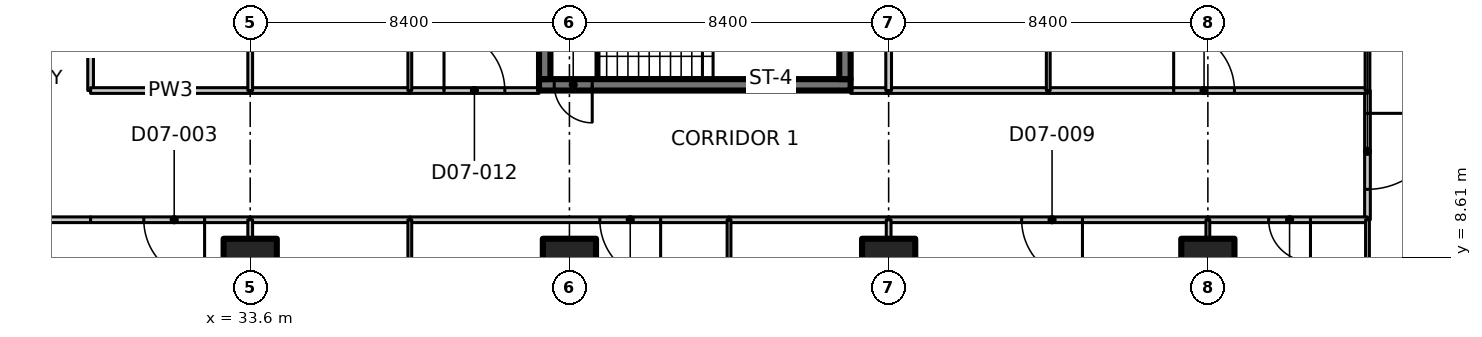
"""IFC4 building model, lengths in metres.
Left out: names, types, materials, properties, quantities, classifications, styles, units other than length and angle.
Written with IfcOpenShell. Run it as: python <this file> out.ifc"""

import sys

from ifc_helpers import new_model, si_unit, direction, frame, frame_2d, origin, origin_2d, place, context, subcontext, project, spatial, polyline, rectangle, outline, extrude, element, fill, save


model = new_model("IFC4")
c1 = context("Model", 3, precision=1e-05, world=origin(), true_north=direction((0.0, 1.0)))
c2 = subcontext(c1, "Body", "Model", "MODEL_VIEW")
j1 = project(units=[si_unit("LENGTHUNIT", "METRE"), si_unit("PLANEANGLEUNIT", "RADIAN")], contexts=[c1])
p1 = place(None, origin())
s1 = spatial("IfcSite", under=j1, at=p1, CompositionType="ELEMENT")
p2 = place(p1, origin())
s2 = spatial("IfcBuilding", under=s1, at=p2, CompositionType="ELEMENT")
p3 = place(p2, frame((0.0, 0.0, 43.7)))
s3 = spatial("IfcBuildingStorey", under=s2, at=p3, CompositionType="ELEMENT", Elevation=43.7)
for number, where, z_axis, x_axis in (
    (1, (33.6, 8.4, 0.0), (0.0, 0.0, 1.0), (1.0, 0.0, 0.0)),
    (2, (42.0, 8.4, 0.0), (0.0, 0.0, 1.0), (1.0, 0.0, 0.0)),
    (3, (50.4, 8.4, 0.0), (0.0, 0.0, 1.0), (1.0, 0.0, 0.0)),
    (4, (58.8, 8.4, 0.0), (0.0, 0.0, 1.0), (1.0, 0.0, 0.0)),
):
    element("IfcColumn", number, at=place(p3, frame(where, z_axis=z_axis, x_axis=x_axis)), inside=s3, PredefinedType="COLUMN", context=c2, shape_type="SweptSolid", body=[
        extrude(rectangle(XDim=1.4, YDim=1.4, at=origin_2d()), origin(), (0.0, 0.0, 1.0), 3.35),
    ])
p4 = place(p3, frame((49.4, 13.15, 0.0), z_axis=(0.0, 0.0, 1.0), x_axis=(-1.0, 0.0, 0.0)))
e5 = element("IfcWall", 5, at=p4, inside=s3, PredefinedType="SHEAR", context=c2, shape_type="SweptSolid", body=[
    extrude(rectangle(XDim=8.2, YDim=0.3, at=frame_2d((4.1, 0.0))), origin(), (0.0, 0.0, 1.0), 3.35),
])
p5 = place(p4, frame((6.8, 0.0, 0.0)))
e6 = element("IfcOpeningElement", 6, at=p5, cuts=e5, PredefinedType="OPENING", context=c2, shape_type="SweptSolid", body=[
    extrude(rectangle(XDim=1.0, YDim=2.1, at=frame_2d((0.5, 1.05))), frame((0.0, 0.16, 0.0), z_axis=(0.0, -1.0, 0.0), x_axis=(1.0, 0.0, 0.0)), (0.0, 0.0, 1.0), 0.32),
])
for number, where, z_axis, x_axis in (
    (7, (41.35, 13.3, 0.0), (0.0, 0.0, 1.0), (0.0, 1.0, 0.0)),
    (8, (49.25, 13.3, 0.0), (0.0, 0.0, 1.0), (0.0, 1.0, 0.0)),
):
    element("IfcWall", number, at=place(p3, frame(where, z_axis=z_axis, x_axis=x_axis)), inside=s3, PredefinedType="SHEAR", context=c2, shape_type="SweptSolid", body=[
        extrude(rectangle(XDim=2.55, YDim=0.3, at=frame_2d((1.275, 0.0))), origin(), (0.0, 0.0, 1.0), 3.35),
    ])
p6 = place(p3, frame((29.4, 9.6, 0.0), z_axis=(0.0, 0.0, 1.0), x_axis=(-1.0, 0.0, 0.0)))
e9 = element("IfcWall", 9, at=p6, inside=s3, PredefinedType="PARTITIONING", context=c2, shape_type="SweptSolid", body=[
    extrude(rectangle(XDim=4.2, YDim=0.15, at=frame_2d((2.1, 0.0))), origin(), (0.0, 0.0, 1.0), 3.33),
])
p7 = place(p3, frame((29.4, 21.2, 0.0), z_axis=(0.0, 0.0, 1.0), x_axis=(0.0, -1.0, 0.0)))
e10 = element("IfcWall", 10, at=p7, inside=s3, PredefinedType="PARTITIONING", context=c2, shape_type="SweptSolid", body=[
    extrude(rectangle(XDim=8.2, YDim=0.15, at=frame_2d((4.1, 0.0))), origin(), (0.0, 0.0, 1.0), 3.33),
])
p8 = place(p7, frame((3.3, 0.0, 0.0)))
e11 = element("IfcOpeningElement", 11, at=p8, cuts=e10, PredefinedType="OPENING", context=c2, shape_type="SweptSolid", body=[
    extrude(rectangle(XDim=1.6, YDim=2.1, at=frame_2d((0.8, 1.05))), frame((0.0, 0.085, 0.0), z_axis=(0.0, -1.0, 0.0), x_axis=(1.0, 0.0, 0.0)), (0.0, 0.0, 1.0), 0.17),
])
p9 = place(p3, frame((63.0, 13.0, 0.0), z_axis=(0.0, 0.0, 1.0), x_axis=(0.0, -1.0, 0.0)))
e12 = element("IfcWall", 12, at=p9, inside=s3, PredefinedType="PARTITIONING", context=c2, shape_type="SweptSolid", body=[
    extrude(rectangle(XDim=3.4, YDim=0.15, at=frame_2d((1.7, 0.0))), origin(), (0.0, 0.0, 1.0), 3.33),
])
p10 = place(p9, frame((0.6, 0.0, 0.0)))
e13 = element("IfcOpeningElement", 13, at=p10, cuts=e12, PredefinedType="OPENING", context=c2, shape_type="SweptSolid", body=[
    extrude(rectangle(XDim=2.0, YDim=2.4, at=frame_2d((1.0, 1.2))), frame((0.0, 0.085, 0.0), z_axis=(0.0, -1.0, 0.0), x_axis=(1.0, 0.0, 0.0)), (0.0, 0.0, 1.0), 0.17),
])
p11 = place(p3, frame((33.6, 9.6, 0.0), z_axis=(0.0, 0.0, 1.0), x_axis=(-1.0, 0.0, 0.0)))
e14 = element("IfcWall", 14, at=p11, inside=s3, PredefinedType="PARTITIONING", context=c2, shape_type="SweptSolid", body=[
    extrude(rectangle(XDim=4.2, YDim=0.15, at=frame_2d((2.1, 0.0))), origin(), (0.0, 0.0, 1.0), 3.33),
])
p12 = place(p11, frame((1.2, 0.0, 0.0)))
e15 = element("IfcOpeningElement", 15, at=p12, cuts=e14, PredefinedType="OPENING", context=c2, shape_type="SweptSolid", body=[
    extrude(rectangle(XDim=1.6, YDim=2.1, at=frame_2d((0.8, 1.05))), frame((0.0, 0.085, 0.0), z_axis=(0.0, -1.0, 0.0), x_axis=(1.0, 0.0, 0.0)), (0.0, 0.0, 1.0), 0.17),
])
p13 = place(p3, frame((46.2, 9.6, 0.0), z_axis=(0.0, 0.0, 1.0), x_axis=(-1.0, 0.0, 0.0)))
e16 = element("IfcWall", 16, at=p13, inside=s3, PredefinedType="PARTITIONING", context=c2, shape_type="SweptSolid", body=[
    extrude(rectangle(XDim=8.4, YDim=0.15, at=frame_2d((4.2, 0.0))), origin(), (0.0, 0.0, 1.0), 3.33),
])
p14 = place(p13, frame((1.8, 0.0, 0.0)))
e17 = element("IfcOpeningElement", 17, at=p14, cuts=e16, PredefinedType="OPENING", context=c2, shape_type="SweptSolid", body=[
    extrude(rectangle(XDim=1.6, YDim=2.1, at=frame_2d((0.8, 1.05))), frame((0.0, 0.085, 0.0), z_axis=(0.0, -1.0, 0.0), x_axis=(1.0, 0.0, 0.0)), (0.0, 0.0, 1.0), 0.17),
])
for number, where, z_axis, x_axis in (
    (18, (50.4, 9.6, 0.0), (0.0, 0.0, 1.0), (-1.0, 0.0, 0.0)),
    (19, (37.8, 9.6, 0.0), (0.0, 0.0, 1.0), (-1.0, 0.0, 0.0)),
):
    element("IfcWall", number, at=place(p3, frame(where, z_axis=z_axis, x_axis=x_axis)), inside=s3, PredefinedType="PARTITIONING", context=c2, shape_type="SweptSolid", body=[
        extrude(rectangle(XDim=4.2, YDim=0.15, at=frame_2d((2.1, 0.0))), origin(), (0.0, 0.0, 1.0), 3.33),
    ])
p15 = place(p3, frame((58.8, 9.6, 0.0), z_axis=(0.0, 0.0, 1.0), x_axis=(-1.0, 0.0, 0.0)))
e20 = element("IfcWall", 20, at=p15, inside=s3, PredefinedType="PARTITIONING", context=c2, shape_type="SweptSolid", body=[
    extrude(rectangle(XDim=8.4, YDim=0.15, at=frame_2d((4.2, 0.0))), origin(), (0.0, 0.0, 1.0), 3.33),
])
p16 = place(p15, frame((3.3, 0.0, 0.0)))
e21 = element("IfcOpeningElement", 21, at=p16, cuts=e20, PredefinedType="OPENING", context=c2, shape_type="SweptSolid", body=[
    extrude(rectangle(XDim=1.6, YDim=2.1, at=frame_2d((0.8, 1.05))), frame((0.0, 0.085, 0.0), z_axis=(0.0, -1.0, 0.0), x_axis=(1.0, 0.0, 0.0)), (0.0, 0.0, 1.0), 0.17),
])
p17 = place(p3, frame((63.0, 9.6, 0.0), z_axis=(0.0, 0.0, 1.0), x_axis=(-1.0, 0.0, 0.0)))
e22 = element("IfcWall", 22, at=p17, inside=s3, PredefinedType="PARTITIONING", context=c2, shape_type="SweptSolid", body=[
    extrude(rectangle(XDim=4.2, YDim=0.15, at=frame_2d((2.1, 0.0))), origin(), (0.0, 0.0, 1.0), 3.33),
])
p18 = place(p17, frame((1.5, 0.0, 0.0)))
e23 = element("IfcOpeningElement", 23, at=p18, cuts=e22, PredefinedType="OPENING", context=c2, shape_type="SweptSolid", body=[
    extrude(rectangle(XDim=1.1, YDim=2.1, at=frame_2d((0.55, 1.05))), frame((0.0, 0.085, 0.0), z_axis=(0.0, -1.0, 0.0), x_axis=(1.0, 0.0, 0.0)), (0.0, 0.0, 1.0), 0.17),
])
p19 = place(p3, frame((29.4, 13.0, 0.0), z_axis=(0.0, 0.0, 1.0), x_axis=(1.0, 0.0, 0.0)))
e24 = element("IfcWall", 24, at=p19, inside=s3, PredefinedType="PARTITIONING", context=c2, shape_type="SweptSolid", body=[
    extrude(rectangle(XDim=4.2, YDim=0.15, at=frame_2d((2.1, 0.0))), origin(), (0.0, 0.0, 1.0), 3.33),
])
p20 = place(p3, frame((37.8, 13.0, 0.0), z_axis=(0.0, 0.0, 1.0), x_axis=(1.0, 0.0, 0.0)))
e25 = element("IfcWall", 25, at=p20, inside=s3, PredefinedType="PARTITIONING", context=c2, shape_type="SweptSolid", body=[
    extrude(rectangle(XDim=3.4, YDim=0.15, at=frame_2d((1.7, 0.0))), origin(), (0.0, 0.0, 1.0), 3.33),
])
p21 = place(p20, frame((0.9, 0.0, 0.0)))
e26 = element("IfcOpeningElement", 26, at=p21, cuts=e25, PredefinedType="OPENING", context=c2, shape_type="SweptSolid", body=[
    extrude(rectangle(XDim=1.6, YDim=2.1, at=frame_2d((0.8, 1.05))), frame((0.0, 0.085, 0.0), z_axis=(0.0, -1.0, 0.0), x_axis=(1.0, 0.0, 0.0)), (0.0, 0.0, 1.0), 0.17),
])
p22 = place(p3, frame((49.4, 13.0, 0.0), z_axis=(0.0, 0.0, 1.0), x_axis=(1.0, 0.0, 0.0)))
e27 = element("IfcWall", 27, at=p22, inside=s3, PredefinedType="PARTITIONING", context=c2, shape_type="SweptSolid", body=[
    extrude(rectangle(XDim=1.0, YDim=0.15, at=frame_2d((0.5, 0.0))), origin(), (0.0, 0.0, 1.0), 3.33),
])
p23 = place(p3, frame((33.6, 13.0, 0.0), z_axis=(0.0, 0.0, 1.0), x_axis=(1.0, 0.0, 0.0)))
e28 = element("IfcWall", 28, at=p23, inside=s3, PredefinedType="PARTITIONING", context=c2, shape_type="SweptSolid", body=[
    extrude(rectangle(XDim=4.2, YDim=0.15, at=frame_2d((2.1, 0.0))), origin(), (0.0, 0.0, 1.0), 3.33),
])
p24 = place(p3, frame((54.6, 13.0, 0.0), z_axis=(0.0, 0.0, 1.0), x_axis=(1.0, 0.0, 0.0)))
e29 = element("IfcWall", 29, at=p24, inside=s3, PredefinedType="PARTITIONING", context=c2, shape_type="SweptSolid", body=[
    extrude(rectangle(XDim=8.4, YDim=0.15, at=frame_2d((4.2, 0.0))), origin(), (0.0, 0.0, 1.0), 3.33),
])
p25 = place(p24, frame((3.3, 0.0, 0.0)))
e30 = element("IfcOpeningElement", 30, at=p25, cuts=e29, PredefinedType="OPENING", context=c2, shape_type="SweptSolid", body=[
    extrude(rectangle(XDim=1.6, YDim=2.1, at=frame_2d((0.8, 1.05))), frame((0.0, 0.085, 0.0), z_axis=(0.0, -1.0, 0.0), x_axis=(1.0, 0.0, 0.0)), (0.0, 0.0, 1.0), 0.17),
])
p26 = place(p3, frame((50.4, 13.0, 0.0), z_axis=(0.0, 0.0, 1.0), x_axis=(1.0, 0.0, 0.0)))
e31 = element("IfcWall", 31, at=p26, inside=s3, PredefinedType="PARTITIONING", context=c2, shape_type="SweptSolid", body=[
    extrude(rectangle(XDim=4.2, YDim=0.15, at=frame_2d((2.1, 0.0))), origin(), (0.0, 0.0, 1.0), 3.33),
])
p27 = place(p3, frame((63.0, -0.2, 0.0), z_axis=(0.0, 0.0, 1.0), x_axis=(0.0, 1.0, 0.0)))
e32 = element("IfcWall", 32, at=p27, inside=s3, PredefinedType="PARTITIONING", context=c2, shape_type="SweptSolid", body=[
    extrude(outline(polyline([(0.0, 0.0), (9.8, 0.0), (9.8, 3.33), (5.066, 3.33), (5.064, 2.98), (3.736, 2.98), (3.734, 3.33), (0.0, 3.33), (0.0, 0.0)])), frame((0.0, 0.05, 0.0), z_axis=(0.0, -1.0, 0.0), x_axis=(1.0, 0.0, 0.0)), (0.0, 0.0, 1.0), 0.1),
])
p28 = place(p3, frame((63.0, 13.0, 0.0), z_axis=(0.0, 0.0, 1.0), x_axis=(0.0, 1.0, 0.0)))
e33 = element("IfcWall", 33, at=p28, inside=s3, PredefinedType="PARTITIONING", context=c2, shape_type="SweptSolid", body=[
    extrude(outline(polyline([(0.0, 0.0), (12.4, 0.0), (12.4, 3.33), (8.678, 3.33), (8.676, 2.98), (7.324, 2.98), (7.322, 3.33), (0.0, 3.33), (0.0, 0.0)])), frame((0.0, 0.062, 0.0), z_axis=(0.0, -1.0, 0.0), x_axis=(1.0, 0.0, 0.0)), (0.0, 0.0, 1.0), 0.125),
])
p29 = place(p3, frame((33.6, 9.6, 0.0), z_axis=(0.0, 0.0, 1.0), x_axis=(0.0, -1.0, 0.0)))
e34 = element("IfcWall", 34, at=p29, inside=s3, PredefinedType="PARTITIONING", context=c2, shape_type="SweptSolid", body=[
    extrude(rectangle(XDim=0.48, YDim=0.125, at=frame_2d((0.24, 0.0))), origin(), (0.0, 0.0, 1.0), 3.33),
])
p30 = place(p3, frame((46.2, 9.6, 0.0), z_axis=(0.0, 0.0, 1.0), x_axis=(0.0, -1.0, 0.0)))
e35 = element("IfcWall", 35, at=p30, inside=s3, PredefinedType="PARTITIONING", context=c2, shape_type="SweptSolid", body=[
    extrude(rectangle(XDim=7.8, YDim=0.1, at=frame_2d((3.9, 0.0))), origin(), (0.0, 0.0, 1.0), 3.33),
])
p31 = place(p30, frame((3.3, 0.0, 0.0)))
e36 = element("IfcOpeningElement", 36, at=p31, cuts=e35, PredefinedType="OPENING", context=c2, shape_type="SweptSolid", body=[
    extrude(rectangle(XDim=1.0, YDim=2.1, at=frame_2d((0.5, 1.05))), frame((0.0, 0.06, 0.0), z_axis=(0.0, -1.0, 0.0), x_axis=(1.0, 0.0, 0.0)), (0.0, 0.0, 1.0), 0.12),
])
p32 = place(p3, frame((37.8, 1.8, 0.0), z_axis=(0.0, 0.0, 1.0), x_axis=(0.0, 1.0, 0.0)))
e37 = element("IfcWall", 37, at=p32, inside=s3, PredefinedType="PARTITIONING", context=c2, shape_type="SweptSolid", body=[
    extrude(rectangle(XDim=7.8, YDim=0.1, at=frame_2d((3.9, 0.0))), origin(), (0.0, 0.0, 1.0), 3.33),
])
p33 = place(p32, frame((3.3, 0.0, 0.0)))
e38 = element("IfcOpeningElement", 38, at=p33, cuts=e37, PredefinedType="OPENING", context=c2, shape_type="SweptSolid", body=[
    extrude(rectangle(XDim=1.0, YDim=2.1, at=frame_2d((0.5, 1.05))), frame((0.0, 0.06, 0.0), z_axis=(0.0, -1.0, 0.0), x_axis=(1.0, 0.0, 0.0)), (0.0, 0.0, 1.0), 0.12),
])
p34 = place(p3, frame((50.4, 9.6, 0.0), z_axis=(0.0, 0.0, 1.0), x_axis=(0.0, -1.0, 0.0)))
e39 = element("IfcWall", 39, at=p34, inside=s3, PredefinedType="PARTITIONING", context=c2, shape_type="SweptSolid", body=[
    extrude(rectangle(XDim=0.48, YDim=0.125, at=frame_2d((0.24, 0.0))), origin(), (0.0, 0.0, 1.0), 3.33),
])
p35 = place(p3, frame((58.8, 9.6, 0.0), z_axis=(0.0, 0.0, 1.0), x_axis=(0.0, -1.0, 0.0)))
e40 = element("IfcWall", 40, at=p35, inside=s3, PredefinedType="PARTITIONING", context=c2, shape_type="SweptSolid", body=[
    extrude(rectangle(XDim=0.48, YDim=0.1, at=frame_2d((0.24, 0.0))), origin(), (0.0, 0.0, 1.0), 3.33),
])
p36 = place(p3, frame((33.6, 16.08, 0.0), z_axis=(0.0, 0.0, 1.0), x_axis=(0.0, -1.0, 0.0)))
e41 = element("IfcWall", 41, at=p36, inside=s3, PredefinedType="PARTITIONING", context=c2, shape_type="SweptSolid", body=[
    extrude(rectangle(XDim=3.08, YDim=0.125, at=frame_2d((1.54, 0.0))), origin(), (0.0, 0.0, 1.0), 3.33),
])
p37 = place(p3, frame((37.8, 13.0, 0.0), z_axis=(0.0, 0.0, 1.0), x_axis=(0.0, 1.0, 0.0)))
e42 = element("IfcWall", 42, at=p37, inside=s3, PredefinedType="PARTITIONING", context=c2, shape_type="SweptSolid", body=[
    extrude(rectangle(XDim=6.6, YDim=0.1, at=frame_2d((3.3, 0.0))), origin(), (0.0, 0.0, 1.0), 3.33),
])
p38 = place(p37, frame((2.7, 0.0, 0.0)))
e43 = element("IfcOpeningElement", 43, at=p38, cuts=e42, PredefinedType="OPENING", context=c2, shape_type="SweptSolid", body=[
    extrude(rectangle(XDim=1.0, YDim=2.1, at=frame_2d((0.5, 1.05))), frame((0.0, 0.06, 0.0), z_axis=(0.0, -1.0, 0.0), x_axis=(1.0, 0.0, 0.0)), (0.0, 0.0, 1.0), 0.12),
])
p39 = place(p3, frame((50.4, 16.08, 0.0), z_axis=(0.0, 0.0, 1.0), x_axis=(0.0, -1.0, 0.0)))
e44 = element("IfcWall", 44, at=p39, inside=s3, PredefinedType="PARTITIONING", context=c2, shape_type="SweptSolid", body=[
    extrude(rectangle(XDim=3.08, YDim=0.15, at=frame_2d((1.54, 0.0))), origin(), (0.0, 0.0, 1.0), 3.33),
])
p40 = place(p3, frame((54.6, 13.0, 0.0), z_axis=(0.0, 0.0, 1.0), x_axis=(0.0, 1.0, 0.0)))
e45 = element("IfcWall", 45, at=p40, inside=s3, PredefinedType="PARTITIONING", context=c2, shape_type="SweptSolid", body=[
    extrude(rectangle(XDim=9.0, YDim=0.1, at=frame_2d((4.5, 0.0))), origin(), (0.0, 0.0, 1.0), 3.33),
])
p41 = place(p40, frame((3.9, 0.0, 0.0)))
e46 = element("IfcOpeningElement", 46, at=p41, cuts=e45, PredefinedType="OPENING", context=c2, shape_type="SweptSolid", body=[
    extrude(rectangle(XDim=1.0, YDim=2.1, at=frame_2d((0.5, 1.05))), frame((0.0, 0.06, 0.0), z_axis=(0.0, -1.0, 0.0), x_axis=(1.0, 0.0, 0.0)), (0.0, 0.0, 1.0), 0.12),
])
p42 = place(p5, origin())
e47 = element("IfcDoor", 47, at=p42, inside=s3, OperationType="SINGLE_SWING_LEFT", PredefinedType="DOOR", context=c2, shape_type="SweptSolid", body=[
    extrude(rectangle(XDim=1.0, YDim=2.1, at=frame_2d((0.5, 1.05))), frame((0.0, 0.025, 0.0), z_axis=(0.0, -1.0, 0.0), x_axis=(1.0, 0.0, 0.0)), (0.0, 0.0, 1.0), 0.05),
])
fill(e6, e47)
p43 = place(p10, origin())
e48 = element("IfcDoor", 48, at=p43, inside=s3, OperationType="DOUBLE_DOOR_SINGLE_SWING", PredefinedType="DOOR", context=c2, shape_type="SweptSolid", body=[
    extrude(rectangle(XDim=2.0, YDim=2.4, at=frame_2d((1.0, 1.2))), frame((0.0, 0.025, 0.0), z_axis=(0.0, -1.0, 0.0), x_axis=(1.0, 0.0, 0.0)), (0.0, 0.0, 1.0), 0.05),
])
fill(e13, e48)
p44 = place(p12, origin())
e49 = element("IfcDoor", 49, at=p44, inside=s3, OperationType="DOUBLE_DOOR_SINGLE_SWING", PredefinedType="DOOR", context=c2, shape_type="SweptSolid", body=[
    extrude(rectangle(XDim=1.6, YDim=2.1, at=frame_2d((0.8, 1.05))), frame((0.0, 0.025, 0.0), z_axis=(0.0, -1.0, 0.0), x_axis=(1.0, 0.0, 0.0)), (0.0, 0.0, 1.0), 0.05),
])
fill(e15, e49)
p45 = place(p14, origin())
e50 = element("IfcDoor", 50, at=p45, inside=s3, OperationType="DOUBLE_DOOR_SINGLE_SWING", PredefinedType="DOOR", context=c2, shape_type="SweptSolid", body=[
    extrude(rectangle(XDim=1.6, YDim=2.1, at=frame_2d((0.8, 1.05))), frame((0.0, 0.025, 0.0), z_axis=(0.0, -1.0, 0.0), x_axis=(1.0, 0.0, 0.0)), (0.0, 0.0, 1.0), 0.05),
])
fill(e17, e50)
p46 = place(p16, origin())
e51 = element("IfcDoor", 51, at=p46, inside=s3, OperationType="DOUBLE_DOOR_SINGLE_SWING", PredefinedType="DOOR", context=c2, shape_type="SweptSolid", body=[
    extrude(rectangle(XDim=1.6, YDim=2.1, at=frame_2d((0.8, 1.05))), frame((0.0, 0.025, 0.0), z_axis=(0.0, -1.0, 0.0), x_axis=(1.0, 0.0, 0.0)), (0.0, 0.0, 1.0), 0.05),
])
fill(e21, e51)
p47 = place(p18, origin())
e52 = element("IfcDoor", 52, at=p47, inside=s3, OperationType="SINGLE_SWING_LEFT", PredefinedType="DOOR", context=c2, shape_type="SweptSolid", body=[
    extrude(rectangle(XDim=1.1, YDim=2.1, at=frame_2d((0.55, 1.05))), frame((0.0, 0.025, 0.0), z_axis=(0.0, -1.0, 0.0), x_axis=(1.0, 0.0, 0.0)), (0.0, 0.0, 1.0), 0.05),
])
fill(e23, e52)
p48 = place(p21, origin())
e53 = element("IfcDoor", 53, at=p48, inside=s3, OperationType="DOUBLE_DOOR_SINGLE_SWING", PredefinedType="DOOR", context=c2, shape_type="SweptSolid", body=[
    extrude(rectangle(XDim=1.6, YDim=2.1, at=frame_2d((0.8, 1.05))), frame((0.0, 0.025, 0.0), z_axis=(0.0, -1.0, 0.0), x_axis=(1.0, 0.0, 0.0)), (0.0, 0.0, 1.0), 0.05),
])
fill(e26, e53)
p49 = place(p25, origin())
e54 = element("IfcDoor", 54, at=p49, inside=s3, OperationType="DOUBLE_DOOR_SINGLE_SWING", PredefinedType="DOOR", context=c2, shape_type="SweptSolid", body=[
    extrude(rectangle(XDim=1.6, YDim=2.1, at=frame_2d((0.8, 1.05))), frame((0.0, 0.025, 0.0), z_axis=(0.0, -1.0, 0.0), x_axis=(1.0, 0.0, 0.0)), (0.0, 0.0, 1.0), 0.05),
])
fill(e30, e54)
save(model, sys.argv[1])
